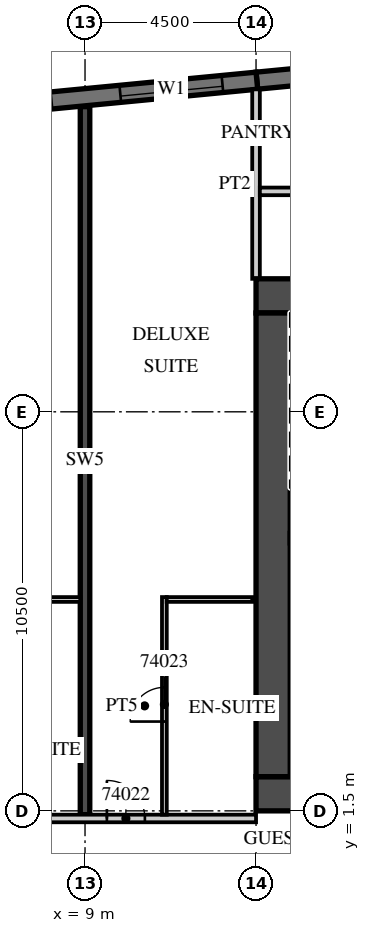
"""IFC4 building model, lengths in metres.
Left out: names, types, materials, properties, quantities, classifications, styles, units other than length and angle.
Written with IfcOpenShell. Run it as: python <this file> out.ifc"""

import sys

from ifc_helpers import new_model, si_unit, direction, frame, frame_2d, origin, place, context, subcontext, project, spatial, rectangle, extrude, element, fill, save


model = new_model("IFC4")
c1 = context("Model", 3, precision=1e-05, world=origin(), true_north=direction((0.0, 1.0)))
c2 = subcontext(c1, "Body", "Model", "MODEL_VIEW")
j1 = project(units=[si_unit("LENGTHUNIT", "METRE"), si_unit("PLANEANGLEUNIT", "RADIAN")], contexts=[c1])
p1 = place(None, origin())
s1 = spatial("IfcSite", under=j1, at=p1, CompositionType="ELEMENT")
p2 = place(p1, origin())
s2 = spatial("IfcBuilding", under=s1, at=p2, CompositionType="ELEMENT")
p3 = place(p2, frame((0.0, 0.0, 294.9)))
s3 = spatial("IfcBuildingStorey", under=s2, at=p3, CompositionType="ELEMENT", Elevation=294.9)
p4 = place(p3, frame((9.0, 1.4, 0.0), z_axis=(0.0, 0.0, 1.0), x_axis=(0.0, 1.0, 0.0)))
e1 = element("IfcWall", 1, at=p4, inside=s3, PredefinedType="SHEAR", context=c2, shape_type="SweptSolid", body=[
    extrude(rectangle(XDim=18.629, YDim=0.25, at=frame_2d((9.315, 0.0))), origin(), (0.0, 0.0, 1.0), 3.3),
])
p5 = place(p3, frame((30.946, 22.391, 0.0), z_axis=(0.0, 0.0, 1.0), x_axis=(-0.995396397117, -0.095843688398, 0.0)))
e2 = element("IfcWall", 2, at=p5, inside=s3, PredefinedType="SOLIDWALL", context=c2, shape_type="SweptSolid", body=[
    extrude(rectangle(XDim=17.505, YDim=0.45, at=frame_2d((8.752, 0.0))), origin(), (0.0, 0.0, 1.0), 3.02),
])
p6 = place(p3, frame((13.521, 20.713, 0.0), z_axis=(0.0, 0.0, 1.0), x_axis=(-0.995396277313, -0.095844932638, 0.0)))
e3 = element("IfcWall", 3, at=p6, inside=s3, PredefinedType="SOLIDWALL", context=c2, shape_type="SweptSolid", body=[
    extrude(rectangle(XDim=51.495, YDim=0.45, at=frame_2d((25.748, 0.0))), origin(), (0.0, 0.0, 1.0), 3.02),
])
p7 = place(p6, frame((0.91, 0.0, 0.45)))
e4 = element("IfcOpeningElement", 4, at=p7, cuts=e3, PredefinedType="OPENING", context=c2, shape_type="SweptSolid", body=[
    extrude(rectangle(XDim=2.7, YDim=2.25, at=frame_2d((1.35, 1.125))), frame((0.0, 0.235, 0.0), z_axis=(0.0, -1.0, 0.0), x_axis=(1.0, 0.0, 0.0)), (0.0, 0.0, 1.0), 0.47),
])
p8 = place(p6, frame((5.431, 0.0, 0.45)))
e5 = element("IfcOpeningElement", 5, at=p8, cuts=e3, PredefinedType="OPENING", context=c2, shape_type="SweptSolid", body=[
    extrude(rectangle(XDim=2.7, YDim=2.25, at=frame_2d((1.35, 1.125))), frame((0.0, 0.235, 0.0), z_axis=(0.0, -1.0, 0.0), x_axis=(1.0, 0.0, 0.0)), (0.0, 0.0, 1.0), 0.47),
])
p9 = place(p6, frame((9.952, 0.0, 0.45)))
e6 = element("IfcOpeningElement", 6, at=p9, cuts=e3, PredefinedType="OPENING", context=c2, shape_type="SweptSolid", body=[
    extrude(rectangle(XDim=2.7, YDim=2.25, at=frame_2d((1.35, 1.125))), frame((0.0, 0.235, 0.0), z_axis=(0.0, -1.0, 0.0), x_axis=(1.0, 0.0, 0.0)), (0.0, 0.0, 1.0), 0.47),
])
p10 = place(p6, frame((14.473, 0.0, 0.45)))
e7 = element("IfcOpeningElement", 7, at=p10, cuts=e3, PredefinedType="OPENING", context=c2, shape_type="SweptSolid", body=[
    extrude(rectangle(XDim=2.7, YDim=2.25, at=frame_2d((1.35, 1.125))), frame((0.0, 0.235, 0.0), z_axis=(0.0, -1.0, 0.0), x_axis=(1.0, 0.0, 0.0)), (0.0, 0.0, 1.0), 0.47),
])
p11 = place(p6, frame((18.994, 0.0, 0.45)))
e8 = element("IfcOpeningElement", 8, at=p11, cuts=e3, PredefinedType="OPENING", context=c2, shape_type="SweptSolid", body=[
    extrude(rectangle(XDim=2.7, YDim=2.25, at=frame_2d((1.35, 1.125))), frame((0.0, 0.235, 0.0), z_axis=(0.0, -1.0, 0.0), x_axis=(1.0, 0.0, 0.0)), (0.0, 0.0, 1.0), 0.47),
])
p12 = place(p6, frame((23.514, 0.0, 0.45)))
e9 = element("IfcOpeningElement", 9, at=p12, cuts=e3, PredefinedType="OPENING", context=c2, shape_type="SweptSolid", body=[
    extrude(rectangle(XDim=2.7, YDim=2.25, at=frame_2d((1.35, 1.125))), frame((0.0, 0.235, 0.0), z_axis=(0.0, -1.0, 0.0), x_axis=(1.0, 0.0, 0.0)), (0.0, 0.0, 1.0), 0.47),
])
p13 = place(p6, frame((28.035, 0.0, 0.45)))
e10 = element("IfcOpeningElement", 10, at=p13, cuts=e3, PredefinedType="OPENING", context=c2, shape_type="SweptSolid", body=[
    extrude(rectangle(XDim=2.7, YDim=2.25, at=frame_2d((1.35, 1.125))), frame((0.0, 0.235, 0.0), z_axis=(0.0, -1.0, 0.0), x_axis=(1.0, 0.0, 0.0)), (0.0, 0.0, 1.0), 0.47),
])
p14 = place(p6, frame((32.556, 0.0, 0.45)))
e11 = element("IfcOpeningElement", 11, at=p14, cuts=e3, PredefinedType="OPENING", context=c2, shape_type="SweptSolid", body=[
    extrude(rectangle(XDim=2.7, YDim=2.25, at=frame_2d((1.35, 1.125))), frame((0.0, 0.235, 0.0), z_axis=(0.0, -1.0, 0.0), x_axis=(1.0, 0.0, 0.0)), (0.0, 0.0, 1.0), 0.47),
])
p15 = place(p6, frame((37.077, 0.0, 0.45)))
e12 = element("IfcOpeningElement", 12, at=p15, cuts=e3, PredefinedType="OPENING", context=c2, shape_type="SweptSolid", body=[
    extrude(rectangle(XDim=2.7, YDim=2.25, at=frame_2d((1.35, 1.125))), frame((0.0, 0.235, 0.0), z_axis=(0.0, -1.0, 0.0), x_axis=(1.0, 0.0, 0.0)), (0.0, 0.0, 1.0), 0.47),
])
p16 = place(p6, frame((41.598, 0.0, 0.45)))
e13 = element("IfcOpeningElement", 13, at=p16, cuts=e3, PredefinedType="OPENING", context=c2, shape_type="SweptSolid", body=[
    extrude(rectangle(XDim=2.7, YDim=2.25, at=frame_2d((1.35, 1.125))), frame((0.0, 0.235, 0.0), z_axis=(0.0, -1.0, 0.0), x_axis=(1.0, 0.0, 0.0)), (0.0, 0.0, 1.0), 0.47),
])
p17 = place(p6, frame((46.118, 0.0, 0.45)))
e14 = element("IfcOpeningElement", 14, at=p17, cuts=e3, PredefinedType="OPENING", context=c2, shape_type="SweptSolid", body=[
    extrude(rectangle(XDim=2.7, YDim=2.25, at=frame_2d((1.35, 1.125))), frame((0.0, 0.235, 0.0), z_axis=(0.0, -1.0, 0.0), x_axis=(1.0, 0.0, 0.0)), (0.0, 0.0, 1.0), 0.47),
])
p18 = place(p3, frame((13.5, 15.5, 0.0), z_axis=(0.0, 0.0, 1.0), x_axis=(0.0, 1.0, 0.0)))
e15 = element("IfcWall", 15, at=p18, inside=s3, PredefinedType="PARTITIONING", context=c2, shape_type="SweptSolid", body=[
    extrude(rectangle(XDim=4.985, YDim=0.2, at=frame_2d((2.493, 0.0))), origin(), (0.0, 0.0, 1.0), 3.02),
])
p19 = place(p3, frame((-39.909, 1.3, 0.0), z_axis=(0.0, 0.0, 1.0), x_axis=(1.0, 0.0, 0.0)))
e16 = element("IfcWall", 16, at=p19, inside=s3, PredefinedType="PARTITIONING", context=c2, shape_type="SweptSolid", body=[
    extrude(rectangle(XDim=53.409, YDim=0.2, at=frame_2d((26.705, 0.0))), origin(), (0.0, 0.0, 1.0), 3.02),
])
p20 = place(p19, frame((0.255, 0.0, 0.0)))
e17 = element("IfcOpeningElement", 17, at=p20, cuts=e16, PredefinedType="OPENING", context=c2, shape_type="SweptSolid", body=[
    extrude(rectangle(XDim=0.9, YDim=2.1, at=frame_2d((0.45, 1.05))), frame((0.0, 0.11, 0.0), z_axis=(0.0, -1.0, 0.0), x_axis=(1.0, 0.0, 0.0)), (0.0, 0.0, 1.0), 0.22),
])
p21 = place(p19, frame((4.484, 0.0, 0.0)))
e18 = element("IfcOpeningElement", 18, at=p21, cuts=e16, PredefinedType="OPENING", context=c2, shape_type="SweptSolid", body=[
    extrude(rectangle(XDim=1.0, YDim=2.1, at=frame_2d((0.5, 1.05))), frame((0.0, 0.11, 0.0), z_axis=(0.0, -1.0, 0.0), x_axis=(1.0, 0.0, 0.0)), (0.0, 0.0, 1.0), 0.22),
])
p22 = place(p19, frame((11.334, 0.0, 0.0)))
e19 = element("IfcOpeningElement", 19, at=p22, cuts=e16, PredefinedType="OPENING", context=c2, shape_type="SweptSolid", body=[
    extrude(rectangle(XDim=1.0, YDim=2.1, at=frame_2d((0.5, 1.05))), frame((0.0, 0.11, 0.0), z_axis=(0.0, -1.0, 0.0), x_axis=(1.0, 0.0, 0.0)), (0.0, 0.0, 1.0), 0.22),
])
p23 = place(p19, frame((15.347, 0.0, 0.0)))
e20 = element("IfcOpeningElement", 20, at=p23, cuts=e16, PredefinedType="OPENING", context=c2, shape_type="SweptSolid", body=[
    extrude(rectangle(XDim=1.2, YDim=2.1, at=frame_2d((0.6, 1.05))), frame((0.0, 0.11, 0.0), z_axis=(0.0, -1.0, 0.0), x_axis=(1.0, 0.0, 0.0)), (0.0, 0.0, 1.0), 0.22),
])
p24 = place(p19, frame((24.859, 0.0, 0.0)))
e21 = element("IfcOpeningElement", 21, at=p24, cuts=e16, PredefinedType="OPENING", context=c2, shape_type="SweptSolid", body=[
    extrude(rectangle(XDim=1.0, YDim=2.1, at=frame_2d((0.5, 1.05))), frame((0.0, 0.11, 0.0), z_axis=(0.0, -1.0, 0.0), x_axis=(1.0, 0.0, 0.0)), (0.0, 0.0, 1.0), 0.22),
])
p25 = place(p19, frame((26.959, 0.0, 0.0)))
e22 = element("IfcOpeningElement", 22, at=p25, cuts=e16, PredefinedType="OPENING", context=c2, shape_type="SweptSolid", body=[
    extrude(rectangle(XDim=1.0, YDim=2.1, at=frame_2d((0.5, 1.05))), frame((0.0, 0.11, 0.0), z_axis=(0.0, -1.0, 0.0), x_axis=(1.0, 0.0, 0.0)), (0.0, 0.0, 1.0), 0.22),
])
p26 = place(p19, frame((33.346, 0.0, 0.0)))
e23 = element("IfcOpeningElement", 23, at=p26, cuts=e16, PredefinedType="OPENING", context=c2, shape_type="SweptSolid", body=[
    extrude(rectangle(XDim=1.2, YDim=2.1, at=frame_2d((0.6, 1.05))), frame((0.0, 0.11, 0.0), z_axis=(0.0, -1.0, 0.0), x_axis=(1.0, 0.0, 0.0)), (0.0, 0.0, 1.0), 0.22),
])
p27 = place(p19, frame((42.859, 0.0, 0.0)))
e24 = element("IfcOpeningElement", 24, at=p27, cuts=e16, PredefinedType="OPENING", context=c2, shape_type="SweptSolid", body=[
    extrude(rectangle(XDim=1.0, YDim=2.1, at=frame_2d((0.5, 1.05))), frame((0.0, 0.11, 0.0), z_axis=(0.0, -1.0, 0.0), x_axis=(1.0, 0.0, 0.0)), (0.0, 0.0, 1.0), 0.22),
])
p28 = place(p19, frame((44.959, 0.0, 0.0)))
e25 = element("IfcOpeningElement", 25, at=p28, cuts=e16, PredefinedType="OPENING", context=c2, shape_type="SweptSolid", body=[
    extrude(rectangle(XDim=1.0, YDim=2.1, at=frame_2d((0.5, 1.05))), frame((0.0, 0.11, 0.0), z_axis=(0.0, -1.0, 0.0), x_axis=(1.0, 0.0, 0.0)), (0.0, 0.0, 1.0), 0.22),
])
p29 = place(p19, frame((49.484, 0.0, 0.0)))
e26 = element("IfcOpeningElement", 26, at=p29, cuts=e16, PredefinedType="OPENING", context=c2, shape_type="SweptSolid", body=[
    extrude(rectangle(XDim=1.0, YDim=2.1, at=frame_2d((0.5, 1.05))), frame((0.0, 0.11, 0.0), z_axis=(0.0, -1.0, 0.0), x_axis=(1.0, 0.0, 0.0)), (0.0, 0.0, 1.0), 0.22),
])
p30 = place(p3, frame((6.625, 7.062, 0.0), z_axis=(0.0, 0.0, 1.0), x_axis=(1.0, 0.0, 0.0)))
e27 = element("IfcWall", 27, at=p30, inside=s3, PredefinedType="PARTITIONING", context=c2, shape_type="SweptSolid", body=[
    extrude(rectangle(XDim=2.25, YDim=0.125, at=frame_2d((1.125, 0.0))), origin(), (0.0, 0.0, 1.0), 3.02),
])
p31 = place(p3, frame((11.088, 1.4, 0.0), z_axis=(0.0, 0.0, 1.0), x_axis=(0.0, 1.0, 0.0)))
e28 = element("IfcWall", 28, at=p31, inside=s3, PredefinedType="PARTITIONING", context=c2, shape_type="SweptSolid", body=[
    extrude(rectangle(XDim=5.725, YDim=0.125, at=frame_2d((2.863, 0.0))), origin(), (0.0, 0.0, 1.0), 3.02),
])
p32 = place(p31, frame((2.45, 0.0, 0.0)))
e29 = element("IfcOpeningElement", 29, at=p32, cuts=e28, PredefinedType="OPENING", context=c2, shape_type="SweptSolid", body=[
    extrude(rectangle(XDim=0.9, YDim=2.1, at=frame_2d((0.45, 1.05))), frame((0.0, 0.073, 0.0), z_axis=(0.0, -1.0, 0.0), x_axis=(1.0, 0.0, 0.0)), (0.0, 0.0, 1.0), 0.145),
])
p33 = place(p3, frame((11.15, 7.062, 0.0), z_axis=(0.0, 0.0, 1.0), x_axis=(1.0, 0.0, 0.0)))
e30 = element("IfcWall", 30, at=p33, inside=s3, PredefinedType="PARTITIONING", context=c2, shape_type="SweptSolid", body=[
    extrude(rectangle(XDim=2.25, YDim=0.125, at=frame_2d((1.125, 0.0))), origin(), (0.0, 0.0, 1.0), 3.02),
])
p34 = place(p3, frame((13.5, 1.95, 0.0), z_axis=(0.0, 0.0, 1.0), x_axis=(1.0, 0.0, 0.0)))
e31 = element("IfcWall", 31, at=p34, inside=s3, PredefinedType="SHEAR", context=c2, shape_type="SweptSolid", body=[
    extrude(rectangle(XDim=18.0, YDim=0.9, at=frame_2d((9.0, 0.0))), origin(), (0.0, 0.0, 1.0), 3.02),
])
p35 = place(p34, frame((1.475, 0.0, 0.0)))
e32 = element("IfcOpeningElement", 32, at=p35, cuts=e31, PredefinedType="OPENING", context=c2, shape_type="SweptSolid", body=[
    extrude(rectangle(XDim=1.8, YDim=2.1, at=frame_2d((0.9, 1.05))), frame((0.0, 0.46, 0.0), z_axis=(0.0, -1.0, 0.0), x_axis=(1.0, 0.0, 0.0)), (0.0, 0.0, 1.0), 0.92),
])
p36 = place(p3, frame((13.5, 15.05, 0.0), z_axis=(0.0, 0.0, 1.0), x_axis=(1.0, 0.0, 0.0)))
e33 = element("IfcWall", 33, at=p36, inside=s3, PredefinedType="SHEAR", context=c2, shape_type="SweptSolid", body=[
    extrude(rectangle(XDim=6.8, YDim=0.9, at=frame_2d((3.4, 0.0))), origin(), (0.0, 0.0, 1.0), 3.02),
])
p37 = place(p36, frame((4.725, 0.0, 0.0)))
e34 = element("IfcOpeningElement", 34, at=p37, cuts=e33, PredefinedType="OPENING", context=c2, shape_type="SweptSolid", body=[
    extrude(rectangle(XDim=1.2, YDim=2.1, at=frame_2d((0.6, 1.05))), frame((0.0, 0.46, 0.0), z_axis=(0.0, -1.0, 0.0), x_axis=(1.0, 0.0, 0.0)), (0.0, 0.0, 1.0), 0.92),
])
p38 = place(p3, frame((13.95, 2.4, 0.0), z_axis=(0.0, 0.0, 1.0), x_axis=(0.0, 1.0, 0.0)))
e35 = element("IfcWall", 35, at=p38, inside=s3, PredefinedType="SHEAR", context=c2, shape_type="SweptSolid", body=[
    extrude(rectangle(XDim=12.2, YDim=0.9, at=frame_2d((6.1, 0.0))), origin(), (0.0, 0.0, 1.0), 3.02),
])
p39 = place(p3, frame((13.6, 17.8, 0.0), z_axis=(0.0, 0.0, 1.0), x_axis=(1.0, 0.0, 0.0)))
e36 = element("IfcWall", 36, at=p39, inside=s3, PredefinedType="PARTITIONING", context=c2, shape_type="SweptSolid", body=[
    extrude(rectangle(XDim=21.354, YDim=0.2, at=frame_2d((10.677, 0.0))), origin(), (0.0, 0.0, 1.0), 3.02),
])
p40 = place(p39, frame((15.012, 0.0, 0.0)))
e37 = element("IfcOpeningElement", 37, at=p40, cuts=e36, PredefinedType="OPENING", context=c2, shape_type="SweptSolid", body=[
    extrude(rectangle(XDim=0.9, YDim=2.1, at=frame_2d((0.45, 1.05))), frame((0.0, 0.11, 0.0), z_axis=(0.0, -1.0, 0.0), x_axis=(1.0, 0.0, 0.0)), (0.0, 0.0, 1.0), 0.22),
])
p41 = place(p39, frame((6.712, 0.0, 0.0)))
e38 = element("IfcOpeningElement", 38, at=p41, cuts=e36, PredefinedType="OPENING", context=c2, shape_type="SweptSolid", body=[
    extrude(rectangle(XDim=0.9, YDim=2.1, at=frame_2d((0.45, 1.05))), frame((0.0, 0.11, 0.0), z_axis=(0.0, -1.0, 0.0), x_axis=(1.0, 0.0, 0.0)), (0.0, 0.0, 1.0), 0.22),
])
p42 = place(p7, origin())
e39 = element("IfcWindow", 39, at=p42, inside=s3, PartitioningType="SINGLE_PANEL", PredefinedType="WINDOW", context=c2, shape_type="SweptSolid", body=[
    extrude(rectangle(XDim=2.7, YDim=2.25, at=frame_2d((1.35, 1.125))), frame((0.0, 0.09, 0.0), z_axis=(0.0, -1.0, 0.0), x_axis=(1.0, 0.0, 0.0)), (0.0, 0.0, 1.0), 0.06),
])
fill(e4, e39)
p43 = place(p29, origin())
e40 = element("IfcDoor", 40, at=p43, inside=s3, OperationType="SINGLE_SWING_LEFT", PredefinedType="DOOR", context=c2, shape_type="SweptSolid", body=[
    extrude(rectangle(XDim=1.0, YDim=2.1, at=frame_2d((0.5, 1.05))), frame((0.0, 0.025, 0.0), z_axis=(0.0, -1.0, 0.0), x_axis=(1.0, 0.0, 0.0)), (0.0, 0.0, 1.0), 0.05),
])
fill(e26, e40)
p44 = place(p32, origin())
e41 = element("IfcDoor", 41, at=p44, inside=s3, OperationType="SINGLE_SWING_LEFT", PredefinedType="DOOR", context=c2, shape_type="SweptSolid", body=[
    extrude(rectangle(XDim=0.9, YDim=2.1, at=frame_2d((0.45, 1.05))), frame((0.0, 0.025, 0.0), z_axis=(0.0, -1.0, 0.0), x_axis=(1.0, 0.0, 0.0)), (0.0, 0.0, 1.0), 0.05),
])
fill(e29, e41)
save(model, sys.argv[1])
